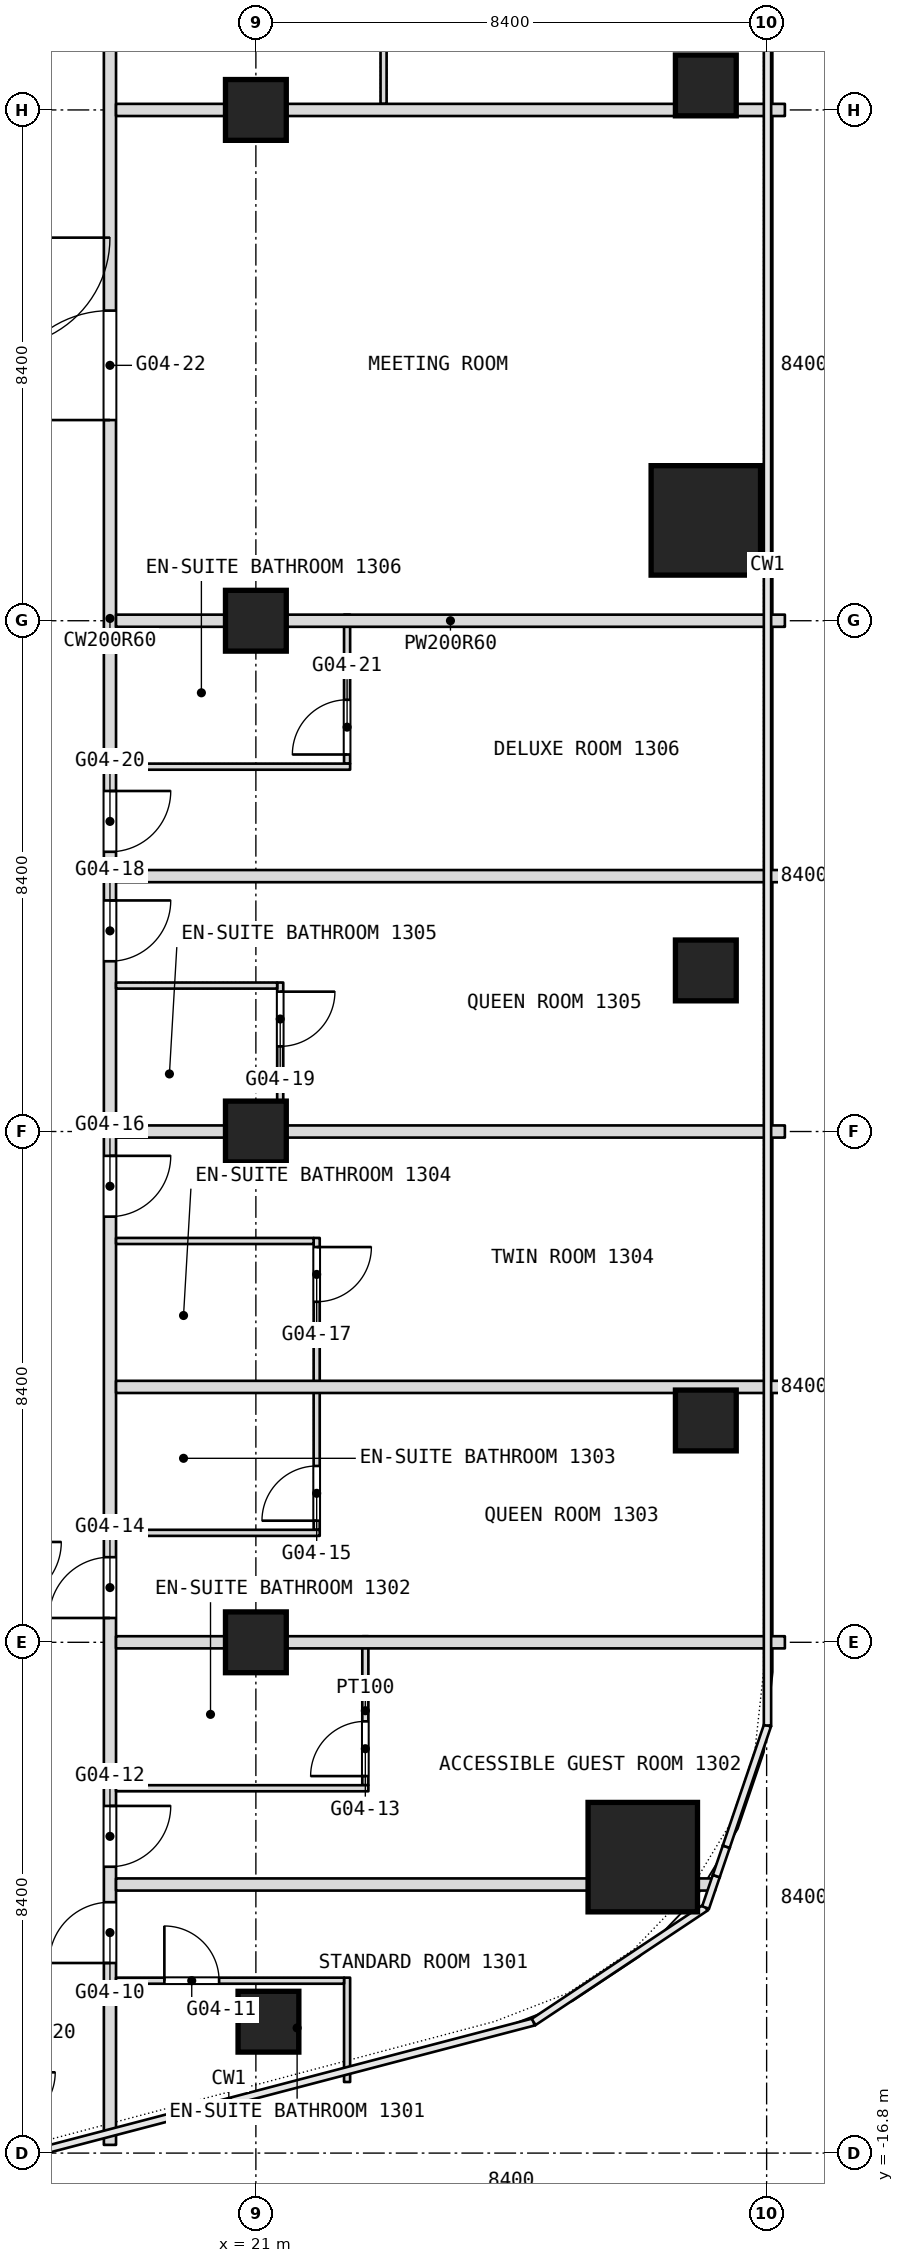
"""IFC4 building model, lengths in metres.
Left out: names, types, materials, properties, quantities, classifications, styles, units other than length and angle.
Written with IfcOpenShell. Run it as: python <this file> out.ifc"""

import sys

from ifc_helpers import new_model, si_unit, direction, frame, frame_2d, origin, origin_2d, place, context, subcontext, project, spatial, rectangle, extrude, element, fill, save


model = new_model("IFC4")
c1 = context("Model", 3, precision=1e-05, world=origin(), true_north=direction((0.0, 1.0)))
c2 = subcontext(c1, "Body", "Model", "MODEL_VIEW")
j1 = project(units=[si_unit("LENGTHUNIT", "METRE"), si_unit("PLANEANGLEUNIT", "RADIAN")], contexts=[c1])
p1 = place(None, origin())
s1 = spatial("IfcSite", under=j1, at=p1, CompositionType="ELEMENT")
p2 = place(p1, origin())
s2 = spatial("IfcBuilding", under=s1, at=p2, CompositionType="ELEMENT")
p3 = place(p2, frame((0.0, 0.0, 61.7)))
s3 = spatial("IfcBuildingStorey", under=s2, at=p3, CompositionType="ELEMENT", Elevation=61.7)
for number, where, z_axis, x_axis in (
    (1, (27.363, -11.933, 0.0), (0.0, 0.0, 1.0), (1.0, 0.0, 0.0)),
    (2, (28.4, 10.05, 0.0), (0.0, 0.0, 1.0), (1.0, 0.0, 0.0)),
):
    element("IfcColumn", number, at=place(p3, frame(where, z_axis=z_axis, x_axis=x_axis)), inside=s3, PredefinedType="COLUMN", context=c2, shape_type="SweptSolid", body=[
        extrude(rectangle(XDim=1.8, YDim=1.8, at=origin_2d()), origin(), (0.0, 0.0, 1.0), 3.6),
    ])
for number, where, z_axis, x_axis in (
    (3, (21.0, -8.4, 0.0), (0.0, 0.0, 1.0), (1.0, 0.0, 0.0)),
    (4, (21.0, 0.0, 0.0), (0.0, 0.0, 1.0), (1.0, 0.0, 0.0)),
    (5, (21.0, 8.4, 0.0), (0.0, 0.0, 1.0), (1.0, 0.0, 0.0)),
    (6, (21.0, 16.8, 0.0), (0.0, 0.0, 1.0), (1.0, 0.0, 0.0)),
    (7, (28.4, 17.203, 0.0), (0.0, 0.0, 1.0), (1.0, 0.0, 0.0)),
    (8, (28.4, 2.649, 0.0), (0.0, 0.0, 1.0), (1.0, 0.0, 0.0)),
    (9, (28.4, -4.752, 0.0), (0.0, 0.0, 1.0), (1.0, 0.0, 0.0)),
    (10, (21.207, -14.639, 0.0), (0.0, 0.0, 1.0), (1.0, 0.0, 0.0)),
):
    element("IfcColumn", number, at=place(p3, frame(where, z_axis=z_axis, x_axis=x_axis)), inside=s3, PredefinedType="COLUMN", context=c2, shape_type="SweptSolid", body=[
        extrude(rectangle(XDim=1.0, YDim=1.0, at=origin_2d()), origin(), (0.0, 0.0, 1.0), 3.6),
    ])
p4 = place(p3, frame((23.1, 16.9, 0.0), z_axis=(0.0, 0.0, 1.0), x_axis=(0.0, 1.0, 0.0)))
e11 = element("IfcWall", 11, at=p4, inside=s3, PredefinedType="PARTITIONING", context=c2, shape_type="SweptSolid", body=[
    extrude(rectangle(XDim=3.55, YDim=0.1, at=frame_2d((1.775, 0.0))), origin(), (0.0, 0.0, 1.0), 3.34),
])
p5 = place(p3, frame((22.8, -10.75, 0.0), z_axis=(0.0, 0.0, 1.0), x_axis=(0.0, 1.0, 0.0)))
e12 = element("IfcWall", 12, at=p5, inside=s3, PredefinedType="PARTITIONING", context=c2, shape_type="SweptSolid", body=[
    extrude(rectangle(XDim=2.45, YDim=0.1, at=frame_2d((1.225, 0.0))), origin(), (0.0, 0.0, 1.0), 3.34),
])
p6 = place(p5, frame((0.15, 0.0, 0.0)))
e13 = element("IfcOpeningElement", 13, at=p6, cuts=e12, PredefinedType="OPENING", context=c2, shape_type="SweptSolid", body=[
    extrude(rectangle(XDim=0.9, YDim=2.1, at=frame_2d((0.45, 1.05))), frame((0.0, 0.05, 0.0), z_axis=(0.0, -1.0, 0.0), x_axis=(1.0, 0.0, 0.0)), (0.0, 0.0, 1.0), 0.1),
])
p7 = place(p3, frame((22.5, -15.631, 0.0), z_axis=(0.0, 0.0, 1.0), x_axis=(0.0, 1.0, 0.0)))
e14 = element("IfcWall", 14, at=p7, inside=s3, PredefinedType="PARTITIONING", context=c2, shape_type="SweptSolid", body=[
    extrude(rectangle(XDim=1.716, YDim=0.1, at=frame_2d((0.858, 0.0))), origin(), (0.0, 0.0, 1.0), 3.34),
])
p8 = place(p3, frame((22.5, 6.05, 0.0), z_axis=(0.0, 0.0, 1.0), x_axis=(0.0, 1.0, 0.0)))
e15 = element("IfcWall", 15, at=p8, inside=s3, PredefinedType="PARTITIONING", context=c2, shape_type="SweptSolid", body=[
    extrude(rectangle(XDim=2.45, YDim=0.1, at=frame_2d((1.225, 0.0))), origin(), (0.0, 0.0, 1.0), 3.34),
])
p9 = place(p8, frame((0.15, 0.0, 0.0)))
e16 = element("IfcOpeningElement", 16, at=p9, cuts=e15, PredefinedType="OPENING", context=c2, shape_type="SweptSolid", body=[
    extrude(rectangle(XDim=0.9, YDim=2.1, at=frame_2d((0.45, 1.05))), frame((0.0, 0.05, 0.0), z_axis=(0.0, -1.0, 0.0), x_axis=(1.0, 0.0, 0.0)), (0.0, 0.0, 1.0), 0.1),
])
p10 = place(p3, frame((22.0, -6.55, 0.0), z_axis=(0.0, 0.0, 1.0), x_axis=(0.0, 1.0, 0.0)))
e17 = element("IfcWall", 17, at=p10, inside=s3, PredefinedType="PARTITIONING", context=c2, shape_type="SweptSolid", body=[
    extrude(rectangle(XDim=4.8, YDim=0.1, at=frame_2d((2.4, 0.0))), origin(), (0.0, 0.0, 1.0), 3.34),
])
p11 = place(p10, frame((0.15, 0.0, 0.0)))
e18 = element("IfcOpeningElement", 18, at=p11, cuts=e17, PredefinedType="OPENING", context=c2, shape_type="SweptSolid", body=[
    extrude(rectangle(XDim=0.9, YDim=2.1, at=frame_2d((0.45, 1.05))), frame((0.0, 0.05, 0.0), z_axis=(0.0, -1.0, 0.0), x_axis=(1.0, 0.0, 0.0)), (0.0, 0.0, 1.0), 0.1),
])
p12 = place(p10, frame((3.75, 0.0, 0.0)))
e19 = element("IfcOpeningElement", 19, at=p12, cuts=e17, PredefinedType="OPENING", context=c2, shape_type="SweptSolid", body=[
    extrude(rectangle(XDim=0.9, YDim=2.1, at=frame_2d((0.45, 1.05))), frame((0.0, 0.05, 0.0), z_axis=(0.0, -1.0, 0.0), x_axis=(1.0, 0.0, 0.0)), (0.0, 0.0, 1.0), 0.1),
])
p13 = place(p3, frame((21.4, 0.1, 0.0), z_axis=(0.0, 0.0, 1.0), x_axis=(0.0, 1.0, 0.0)))
e20 = element("IfcWall", 20, at=p13, inside=s3, PredefinedType="PARTITIONING", context=c2, shape_type="SweptSolid", body=[
    extrude(rectangle(XDim=2.35, YDim=0.1, at=frame_2d((1.175, 0.0))), origin(), (0.0, 0.0, 1.0), 3.34),
])
p14 = place(p13, frame((1.3, 0.0, 0.0)))
e21 = element("IfcOpeningElement", 21, at=p14, cuts=e20, PredefinedType="OPENING", context=c2, shape_type="SweptSolid", body=[
    extrude(rectangle(XDim=0.9, YDim=2.1, at=frame_2d((0.45, 1.05))), frame((0.0, 0.05, 0.0), z_axis=(0.0, -1.0, 0.0), x_axis=(1.0, 0.0, 0.0)), (0.0, 0.0, 1.0), 0.1),
])
p15 = place(p3, frame((18.6, -16.665, 0.0), z_axis=(0.0, 0.0, 1.0), x_axis=(0.0, 1.0, 0.0)))
e22 = element("IfcWall", 22, at=p15, inside=s3, PredefinedType="PARTITIONING", context=c2, shape_type="SweptSolid", body=[
    extrude(rectangle(XDim=50.205, YDim=0.2, at=frame_2d((25.103, 0.0))), origin(), (0.0, 0.0, 1.0), 3.34),
])
p16 = place(p15, frame((2.991, 0.0, 0.0)))
e23 = element("IfcOpeningElement", 23, at=p16, cuts=e22, PredefinedType="OPENING", context=c2, shape_type="SweptSolid", body=[
    extrude(rectangle(XDim=1.0, YDim=2.1, at=frame_2d((0.5, 1.05))), frame((0.0, 0.1, 0.0), z_axis=(0.0, -1.0, 0.0), x_axis=(1.0, 0.0, 0.0)), (0.0, 0.0, 1.0), 0.2),
])
p17 = place(p15, frame((4.574, 0.0, 0.0)))
e24 = element("IfcOpeningElement", 24, at=p17, cuts=e22, PredefinedType="OPENING", context=c2, shape_type="SweptSolid", body=[
    extrude(rectangle(XDim=1.0, YDim=2.1, at=frame_2d((0.5, 1.05))), frame((0.0, 0.1, 0.0), z_axis=(0.0, -1.0, 0.0), x_axis=(1.0, 0.0, 0.0)), (0.0, 0.0, 1.0), 0.2),
])
p18 = place(p15, frame((8.665, 0.0, 0.0)))
e25 = element("IfcOpeningElement", 25, at=p18, cuts=e22, PredefinedType="OPENING", context=c2, shape_type="SweptSolid", body=[
    extrude(rectangle(XDim=1.0, YDim=2.1, at=frame_2d((0.5, 1.05))), frame((0.0, 0.1, 0.0), z_axis=(0.0, -1.0, 0.0), x_axis=(1.0, 0.0, 0.0)), (0.0, 0.0, 1.0), 0.2),
])
p19 = place(p15, frame((15.265, 0.0, 0.0)))
e26 = element("IfcOpeningElement", 26, at=p19, cuts=e22, PredefinedType="OPENING", context=c2, shape_type="SweptSolid", body=[
    extrude(rectangle(XDim=1.0, YDim=2.1, at=frame_2d((0.5, 1.05))), frame((0.0, 0.1, 0.0), z_axis=(0.0, -1.0, 0.0), x_axis=(1.0, 0.0, 0.0)), (0.0, 0.0, 1.0), 0.2),
])
p20 = place(p15, frame((19.465, 0.0, 0.0)))
e27 = element("IfcOpeningElement", 27, at=p20, cuts=e22, PredefinedType="OPENING", context=c2, shape_type="SweptSolid", body=[
    extrude(rectangle(XDim=1.0, YDim=2.1, at=frame_2d((0.5, 1.05))), frame((0.0, 0.1, 0.0), z_axis=(0.0, -1.0, 0.0), x_axis=(1.0, 0.0, 0.0)), (0.0, 0.0, 1.0), 0.2),
])
p21 = place(p15, frame((21.265, 0.0, 0.0)))
e28 = element("IfcOpeningElement", 28, at=p21, cuts=e22, PredefinedType="OPENING", context=c2, shape_type="SweptSolid", body=[
    extrude(rectangle(XDim=1.0, YDim=2.1, at=frame_2d((0.5, 1.05))), frame((0.0, 0.1, 0.0), z_axis=(0.0, -1.0, 0.0), x_axis=(1.0, 0.0, 0.0)), (0.0, 0.0, 1.0), 0.2),
])
p22 = place(p15, frame((28.365, 0.0, 0.0)))
e29 = element("IfcOpeningElement", 29, at=p22, cuts=e22, PredefinedType="OPENING", context=c2, shape_type="SweptSolid", body=[
    extrude(rectangle(XDim=1.8, YDim=2.1, at=frame_2d((0.9, 1.05))), frame((0.0, 0.1, 0.0), z_axis=(0.0, -1.0, 0.0), x_axis=(1.0, 0.0, 0.0)), (0.0, 0.0, 1.0), 0.2),
])
p23 = place(p15, frame((37.165, 0.0, 0.0)))
e30 = element("IfcOpeningElement", 30, at=p23, cuts=e22, PredefinedType="OPENING", context=c2, shape_type="SweptSolid", body=[
    extrude(rectangle(XDim=1.1, YDim=2.1, at=frame_2d((0.55, 1.05))), frame((0.0, 0.1, 0.0), z_axis=(0.0, -1.0, 0.0), x_axis=(1.0, 0.0, 0.0)), (0.0, 0.0, 1.0), 0.2),
])
p24 = place(p15, frame((43.415, 0.0, 0.0)))
e31 = element("IfcOpeningElement", 31, at=p24, cuts=e22, PredefinedType="OPENING", context=c2, shape_type="SweptSolid", body=[
    extrude(rectangle(XDim=1.1, YDim=2.1, at=frame_2d((0.55, 1.05))), frame((0.0, 0.1, 0.0), z_axis=(0.0, -1.0, 0.0), x_axis=(1.0, 0.0, 0.0)), (0.0, 0.0, 1.0), 0.2),
])
p25 = place(p3, frame((18.7, -13.965, 0.0), z_axis=(0.0, 0.0, 1.0), x_axis=(1.0, 0.0, 0.0)))
e32 = element("IfcWall", 32, at=p25, inside=s3, PredefinedType="PARTITIONING", context=c2, shape_type="SweptSolid", body=[
    extrude(rectangle(XDim=3.75, YDim=0.1, at=frame_2d((1.875, 0.0))), origin(), (0.0, 0.0, 1.0), 3.34),
])
p26 = place(p25, frame((0.795, 0.0, 0.0)))
e33 = element("IfcOpeningElement", 33, at=p26, cuts=e32, PredefinedType="OPENING", context=c2, shape_type="SweptSolid", body=[
    extrude(rectangle(XDim=0.9, YDim=2.1, at=frame_2d((0.45, 1.05))), frame((0.0, 0.05, 0.0), z_axis=(0.0, -1.0, 0.0), x_axis=(1.0, 0.0, 0.0)), (0.0, 0.0, 1.0), 0.1),
])
p27 = place(p3, frame((18.7, -12.383, 0.0), z_axis=(0.0, 0.0, 1.0), x_axis=(1.0, 0.0, 0.0)))
e34 = element("IfcWall", 34, at=p27, inside=s3, PredefinedType="PARTITIONING", context=c2, shape_type="SweptSolid", body=[
    extrude(rectangle(XDim=7.763, YDim=0.2, at=frame_2d((3.881, 0.0))), origin(), (0.0, 0.0, 1.0), 3.34),
])
p28 = place(p3, frame((28.263, -12.383, 0.0), z_axis=(0.0, 0.0, 1.0), x_axis=(1.0, 0.0, 0.0)))
e35 = element("IfcWall", 35, at=p28, inside=s3, PredefinedType="PARTITIONING", context=c2, shape_type="SweptSolid", body=[
    extrude(rectangle(XDim=0.29, YDim=0.2, at=frame_2d((0.145, 0.0))), origin(), (0.0, 0.0, 1.0), 3.34),
])
p29 = place(p3, frame((18.7, -10.8, 0.0), z_axis=(0.0, 0.0, 1.0), x_axis=(1.0, 0.0, 0.0)))
e36 = element("IfcWall", 36, at=p29, inside=s3, PredefinedType="PARTITIONING", context=c2, shape_type="SweptSolid", body=[
    extrude(rectangle(XDim=4.15, YDim=0.1, at=frame_2d((2.075, 0.0))), origin(), (0.0, 0.0, 1.0), 3.34),
])
p30 = place(p3, frame((18.7, -8.4, 0.0), z_axis=(0.0, 0.0, 1.0), x_axis=(1.0, 0.0, 0.0)))
e37 = element("IfcWall", 37, at=p30, inside=s3, PredefinedType="PARTITIONING", context=c2, shape_type="SweptSolid", body=[
    extrude(rectangle(XDim=11.0, YDim=0.2, at=frame_2d((5.5, 0.0))), origin(), (0.0, 0.0, 1.0), 2.84),
])
p31 = place(p3, frame((18.7, -6.6, 0.0), z_axis=(0.0, 0.0, 1.0), x_axis=(1.0, 0.0, 0.0)))
e38 = element("IfcWall", 38, at=p31, inside=s3, PredefinedType="PARTITIONING", context=c2, shape_type="SweptSolid", body=[
    extrude(rectangle(XDim=3.35, YDim=0.1, at=frame_2d((1.675, 0.0))), origin(), (0.0, 0.0, 1.0), 3.34),
])
p32 = place(p3, frame((18.7, -4.2, 0.0), z_axis=(0.0, 0.0, 1.0), x_axis=(1.0, 0.0, 0.0)))
e39 = element("IfcWall", 39, at=p32, inside=s3, PredefinedType="PARTITIONING", context=c2, shape_type="SweptSolid", body=[
    extrude(rectangle(XDim=11.0, YDim=0.2, at=frame_2d((5.5, 0.0))), origin(), (0.0, 0.0, 1.0), 3.34),
])
p33 = place(p3, frame((18.7, -1.8, 0.0), z_axis=(0.0, 0.0, 1.0), x_axis=(1.0, 0.0, 0.0)))
e40 = element("IfcWall", 40, at=p33, inside=s3, PredefinedType="PARTITIONING", context=c2, shape_type="SweptSolid", body=[
    extrude(rectangle(XDim=3.25, YDim=0.1, at=frame_2d((1.625, 0.0))), origin(), (0.0, 0.0, 1.0), 3.34),
])
p34 = place(p3, frame((18.7, 0.0, 0.0), z_axis=(0.0, 0.0, 1.0), x_axis=(1.0, 0.0, 0.0)))
e41 = element("IfcWall", 41, at=p34, inside=s3, PredefinedType="PARTITIONING", context=c2, shape_type="SweptSolid", body=[
    extrude(rectangle(XDim=11.0, YDim=0.2, at=frame_2d((5.5, 0.0))), origin(), (0.0, 0.0, 1.0), 2.84),
])
p35 = place(p3, frame((18.7, 2.4, 0.0), z_axis=(0.0, 0.0, 1.0), x_axis=(1.0, 0.0, 0.0)))
e42 = element("IfcWall", 42, at=p35, inside=s3, PredefinedType="PARTITIONING", context=c2, shape_type="SweptSolid", body=[
    extrude(rectangle(XDim=2.65, YDim=0.1, at=frame_2d((1.325, 0.0))), origin(), (0.0, 0.0, 1.0), 3.34),
])
p36 = place(p3, frame((18.7, 4.2, 0.0), z_axis=(0.0, 0.0, 1.0), x_axis=(1.0, 0.0, 0.0)))
e43 = element("IfcWall", 43, at=p36, inside=s3, PredefinedType="PARTITIONING", context=c2, shape_type="SweptSolid", body=[
    extrude(rectangle(XDim=11.0, YDim=0.2, at=frame_2d((5.5, 0.0))), origin(), (0.0, 0.0, 1.0), 3.34),
])
p37 = place(p3, frame((18.7, 6.0, 0.0), z_axis=(0.0, 0.0, 1.0), x_axis=(1.0, 0.0, 0.0)))
e44 = element("IfcWall", 44, at=p37, inside=s3, PredefinedType="PARTITIONING", context=c2, shape_type="SweptSolid", body=[
    extrude(rectangle(XDim=3.85, YDim=0.1, at=frame_2d((1.925, 0.0))), origin(), (0.0, 0.0, 1.0), 3.34),
])
for number, where, z_axis, x_axis in (
    (45, (18.7, 8.4, 0.0), (0.0, 0.0, 1.0), (1.0, 0.0, 0.0)),
    (46, (18.7, 16.8, 0.0), (0.0, 0.0, 1.0), (1.0, 0.0, 0.0)),
):
    element("IfcWall", number, at=place(p3, frame(where, z_axis=z_axis, x_axis=x_axis)), inside=s3, PredefinedType="PARTITIONING", context=c2, shape_type="SweptSolid", body=[
        extrude(rectangle(XDim=11.0, YDim=0.2, at=frame_2d((5.5, 0.0))), origin(), (0.0, 0.0, 1.0), 2.84),
    ])
p38 = place(p6, origin())
e47 = element("IfcDoor", 47, at=p38, inside=s3, OperationType="SINGLE_SWING_LEFT", PredefinedType="DOOR", context=c2, shape_type="SweptSolid", body=[
    extrude(rectangle(XDim=0.9, YDim=2.1, at=frame_2d((0.45, 1.05))), frame((0.0, 0.025, 0.0), z_axis=(0.0, -1.0, 0.0), x_axis=(1.0, 0.0, 0.0)), (0.0, 0.0, 1.0), 0.05),
])
fill(e13, e47)
p39 = place(p9, origin())
e48 = element("IfcDoor", 48, at=p39, inside=s3, OperationType="SINGLE_SWING_LEFT", PredefinedType="DOOR", context=c2, shape_type="SweptSolid", body=[
    extrude(rectangle(XDim=0.9, YDim=2.1, at=frame_2d((0.45, 1.05))), frame((0.0, 0.025, 0.0), z_axis=(0.0, -1.0, 0.0), x_axis=(1.0, 0.0, 0.0)), (0.0, 0.0, 1.0), 0.05),
])
fill(e16, e48)
p40 = place(p11, origin())
e49 = element("IfcDoor", 49, at=p40, inside=s3, OperationType="SINGLE_SWING_LEFT", PredefinedType="DOOR", context=c2, shape_type="SweptSolid", body=[
    extrude(rectangle(XDim=0.9, YDim=2.1, at=frame_2d((0.45, 1.05))), frame((0.0, 0.025, 0.0), z_axis=(0.0, -1.0, 0.0), x_axis=(1.0, 0.0, 0.0)), (0.0, 0.0, 1.0), 0.05),
])
fill(e18, e49)
p41 = place(p12, origin())
e50 = element("IfcDoor", 50, at=p41, inside=s3, OperationType="SINGLE_SWING_RIGHT", PredefinedType="DOOR", context=c2, shape_type="SweptSolid", body=[
    extrude(rectangle(XDim=0.9, YDim=2.1, at=frame_2d((0.45, 1.05))), frame((0.0, 0.025, 0.0), z_axis=(0.0, -1.0, 0.0), x_axis=(1.0, 0.0, 0.0)), (0.0, 0.0, 1.0), 0.05),
])
fill(e19, e50)
p42 = place(p14, origin())
e51 = element("IfcDoor", 51, at=p42, inside=s3, OperationType="SINGLE_SWING_RIGHT", PredefinedType="DOOR", context=c2, shape_type="SweptSolid", body=[
    extrude(rectangle(XDim=0.9, YDim=2.1, at=frame_2d((0.45, 1.05))), frame((0.0, 0.025, 0.0), z_axis=(0.0, -1.0, 0.0), x_axis=(1.0, 0.0, 0.0)), (0.0, 0.0, 1.0), 0.05),
])
fill(e21, e51)
p43 = place(p16, origin())
e52 = element("IfcDoor", 52, at=p43, inside=s3, OperationType="SINGLE_SWING_RIGHT", PredefinedType="DOOR", context=c2, shape_type="SweptSolid", body=[
    extrude(rectangle(XDim=1.0, YDim=2.1, at=frame_2d((0.5, 1.05))), frame((0.0, 0.025, 0.0), z_axis=(0.0, -1.0, 0.0), x_axis=(1.0, 0.0, 0.0)), (0.0, 0.0, 1.0), 0.05),
])
fill(e23, e52)
p44 = place(p17, origin())
e53 = element("IfcDoor", 53, at=p44, inside=s3, OperationType="SINGLE_SWING_RIGHT", PredefinedType="DOOR", context=c2, shape_type="SweptSolid", body=[
    extrude(rectangle(XDim=1.0, YDim=2.1, at=frame_2d((0.5, 1.05))), frame((0.0, 0.025, 0.0), z_axis=(0.0, -1.0, 0.0), x_axis=(1.0, 0.0, 0.0)), (0.0, 0.0, 1.0), 0.05),
])
fill(e24, e53)
p45 = place(p18, origin())
e54 = element("IfcDoor", 54, at=p45, inside=s3, OperationType="SINGLE_SWING_RIGHT", PredefinedType="DOOR", context=c2, shape_type="SweptSolid", body=[
    extrude(rectangle(XDim=1.0, YDim=2.1, at=frame_2d((0.5, 1.05))), frame((0.0, 0.025, 0.0), z_axis=(0.0, -1.0, 0.0), x_axis=(1.0, 0.0, 0.0)), (0.0, 0.0, 1.0), 0.05),
])
fill(e25, e54)
p46 = place(p19, origin())
e55 = element("IfcDoor", 55, at=p46, inside=s3, OperationType="SINGLE_SWING_RIGHT", PredefinedType="DOOR", context=c2, shape_type="SweptSolid", body=[
    extrude(rectangle(XDim=1.0, YDim=2.1, at=frame_2d((0.5, 1.05))), frame((0.0, 0.025, 0.0), z_axis=(0.0, -1.0, 0.0), x_axis=(1.0, 0.0, 0.0)), (0.0, 0.0, 1.0), 0.05),
])
fill(e26, e55)
p47 = place(p20, origin())
e56 = element("IfcDoor", 56, at=p47, inside=s3, OperationType="SINGLE_SWING_RIGHT", PredefinedType="DOOR", context=c2, shape_type="SweptSolid", body=[
    extrude(rectangle(XDim=1.0, YDim=2.1, at=frame_2d((0.5, 1.05))), frame((0.0, 0.025, 0.0), z_axis=(0.0, -1.0, 0.0), x_axis=(1.0, 0.0, 0.0)), (0.0, 0.0, 1.0), 0.05),
])
fill(e27, e56)
p48 = place(p21, origin())
e57 = element("IfcDoor", 57, at=p48, inside=s3, OperationType="SINGLE_SWING_RIGHT", PredefinedType="DOOR", context=c2, shape_type="SweptSolid", body=[
    extrude(rectangle(XDim=1.0, YDim=2.1, at=frame_2d((0.5, 1.05))), frame((0.0, 0.025, 0.0), z_axis=(0.0, -1.0, 0.0), x_axis=(1.0, 0.0, 0.0)), (0.0, 0.0, 1.0), 0.05),
])
fill(e28, e57)
p49 = place(p22, origin())
e58 = element("IfcDoor", 58, at=p49, inside=s3, OperationType="DOUBLE_DOOR_SINGLE_SWING", PredefinedType="DOOR", context=c2, shape_type="SweptSolid", body=[
    extrude(rectangle(XDim=1.8, YDim=2.1, at=frame_2d((0.9, 1.05))), frame((0.0, 0.025, 0.0), z_axis=(0.0, -1.0, 0.0), x_axis=(1.0, 0.0, 0.0)), (0.0, 0.0, 1.0), 0.05),
])
fill(e29, e58)
p50 = place(p26, origin())
e59 = element("IfcDoor", 59, at=p50, inside=s3, OperationType="SINGLE_SWING_LEFT", PredefinedType="DOOR", context=c2, shape_type="SweptSolid", body=[
    extrude(rectangle(XDim=0.9, YDim=2.1, at=frame_2d((0.45, 1.05))), frame((0.0, 0.025, 0.0), z_axis=(0.0, -1.0, 0.0), x_axis=(1.0, 0.0, 0.0)), (0.0, 0.0, 1.0), 0.05),
])
fill(e33, e59)
save(model, sys.argv[1])
